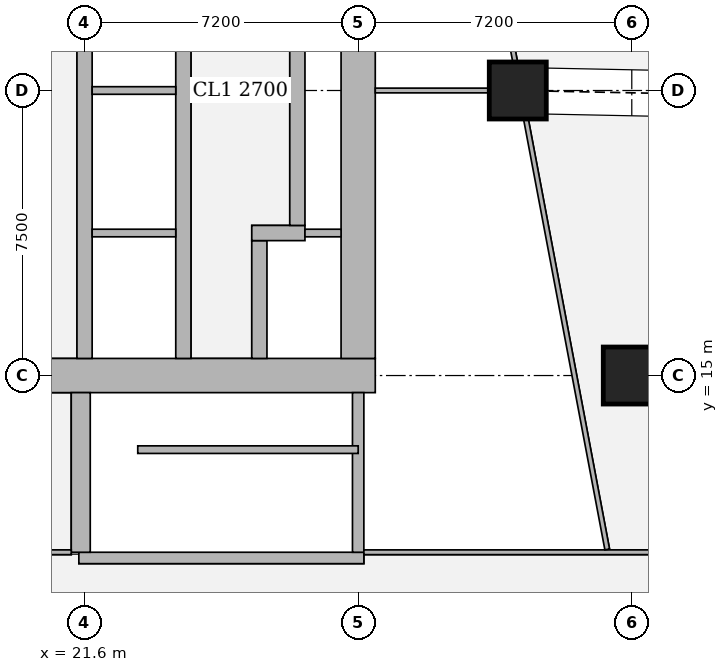
"""IFC4 building model, lengths in metres.
Left out: names, types, materials, properties, quantities, classifications, styles, units other than length and angle.
Written with IfcOpenShell. Run it as: python <this file> out.ifc"""

import sys

from ifc_helpers import new_model, si_unit, direction, frame, frame_2d, origin, origin_2d, place, context, subcontext, project, spatial, rectangle, extrude, element, fill, save


model = new_model("IFC4")
c1 = context("Model", 3, precision=1e-05, world=origin(), true_north=direction((0.0, 1.0)))
c2 = subcontext(c1, "Body", "Model", "MODEL_VIEW")
j1 = project(units=[si_unit("LENGTHUNIT", "METRE"), si_unit("PLANEANGLEUNIT", "RADIAN")], contexts=[c1])
p1 = place(None, origin())
s1 = spatial("IfcSite", under=j1, at=p1, CompositionType="ELEMENT")
p2 = place(p1, origin())
s2 = spatial("IfcBuilding", under=s1, at=p2, CompositionType="ELEMENT")
p3 = place(p2, frame((0.0, 0.0, 180.8)))
s3 = spatial("IfcBuildingStorey", under=s2, at=p3, CompositionType="ELEMENT", Elevation=180.8)
for number, where, z_axis, x_axis in (
    (1, (36.0, 15.0, 0.0), (0.0, 0.0, 1.0), (1.0, 0.0, 0.0)),
    (2, (33.0, 22.5, 0.0), (0.0, 0.0, 1.0), (1.0, 0.0, 0.0)),
):
    element("IfcColumn", number, at=place(p3, frame(where, z_axis=z_axis, x_axis=x_axis)), inside=s3, PredefinedType="COLUMN", context=c2, shape_type="SweptSolid", body=[
        extrude(rectangle(XDim=1.5, YDim=1.5, at=origin_2d()), origin(), (0.0, 0.0, 1.0), 3.75),
    ])
p4 = place(p3, frame((13.95, 15.0, 0.0), z_axis=(0.0, 0.0, 1.0), x_axis=(1.0, 0.0, 0.0)))
e3 = element("IfcWall", 3, at=p4, inside=s3, PredefinedType="SHEAR", context=c2, shape_type="SweptSolid", body=[
    extrude(rectangle(XDim=15.3, YDim=0.9, at=frame_2d((7.65, 0.0))), origin(), (0.0, 0.0, 1.0), 3.75),
])
p5 = place(p4, frame((4.45, 0.0, 0.0)))
e4 = element("IfcOpeningElement", 4, at=p5, cuts=e3, PredefinedType="OPENING", context=c2, shape_type="SweptSolid", body=[
    extrude(rectangle(XDim=1.8, YDim=2.1, at=frame_2d((0.9, 1.05))), frame((0.0, 0.46, 0.0), z_axis=(0.0, -1.0, 0.0), x_axis=(1.0, 0.0, 0.0)), (0.0, 0.0, 1.0), 0.92),
])
p6 = place(p4, frame((10.7, 0.0, 0.0)))
e5 = element("IfcOpeningElement", 5, at=p6, cuts=e3, PredefinedType="OPENING", context=c2, shape_type="SweptSolid", body=[
    extrude(rectangle(XDim=1.1, YDim=2.1, at=frame_2d((0.55, 1.05))), frame((0.0, 0.46, 0.0), z_axis=(0.0, -1.0, 0.0), x_axis=(1.0, 0.0, 0.0)), (0.0, 0.0, 1.0), 0.92),
])
p7 = place(p3, frame((28.8, 15.45, 0.0), z_axis=(0.0, 0.0, 1.0), x_axis=(0.0, 1.0, 0.0)))
e6 = element("IfcWall", 6, at=p7, inside=s3, PredefinedType="SHEAR", context=c2, shape_type="SweptSolid", body=[
    extrude(rectangle(XDim=14.1, YDim=0.9, at=frame_2d((7.05, 0.0))), origin(), (0.0, 0.0, 1.0), 3.75),
])
p8 = place(p3, frame((21.6, 15.45, 0.0), z_axis=(0.0, 0.0, 1.0), x_axis=(0.0, 1.0, 0.0)))
e7 = element("IfcWall", 7, at=p8, inside=s3, PredefinedType="SHEAR", context=c2, shape_type="SweptSolid", body=[
    extrude(rectangle(XDim=14.1, YDim=0.4, at=frame_2d((7.05, 0.0))), origin(), (0.0, 0.0, 1.0), 3.75),
])
p9 = place(p8, frame((0.875, 0.0, 0.0)))
e8 = element("IfcOpeningElement", 8, at=p9, cuts=e7, PredefinedType="OPENING", context=c2, shape_type="SweptSolid", body=[
    extrude(rectangle(XDim=1.1, YDim=2.1, at=frame_2d((0.55, 1.05))), frame((0.0, 0.21, 0.0), z_axis=(0.0, -1.0, 0.0), x_axis=(1.0, 0.0, 0.0)), (0.0, 0.0, 1.0), 0.42),
])
p10 = place(p8, frame((4.625, 0.0, 0.0)))
e9 = element("IfcOpeningElement", 9, at=p10, cuts=e7, PredefinedType="OPENING", context=c2, shape_type="SweptSolid", body=[
    extrude(rectangle(XDim=1.1, YDim=2.1, at=frame_2d((0.55, 1.05))), frame((0.0, 0.21, 0.0), z_axis=(0.0, -1.0, 0.0), x_axis=(1.0, 0.0, 0.0)), (0.0, 0.0, 1.0), 0.42),
])
p11 = place(p8, frame((8.375, 0.0, 0.0)))
e10 = element("IfcOpeningElement", 10, at=p11, cuts=e7, PredefinedType="OPENING", context=c2, shape_type="SweptSolid", body=[
    extrude(rectangle(XDim=1.1, YDim=2.1, at=frame_2d((0.55, 1.05))), frame((0.0, 0.21, 0.0), z_axis=(0.0, -1.0, 0.0), x_axis=(1.0, 0.0, 0.0)), (0.0, 0.0, 1.0), 0.42),
])
p12 = place(p8, frame((12.125, 0.0, 0.0)))
e11 = element("IfcOpeningElement", 11, at=p12, cuts=e7, PredefinedType="OPENING", context=c2, shape_type="SweptSolid", body=[
    extrude(rectangle(XDim=1.1, YDim=2.1, at=frame_2d((0.55, 1.05))), frame((0.0, 0.21, 0.0), z_axis=(0.0, -1.0, 0.0), x_axis=(1.0, 0.0, 0.0)), (0.0, 0.0, 1.0), 0.42),
])
p13 = place(p3, frame((24.2, 15.45, 0.0), z_axis=(0.0, 0.0, 1.0), x_axis=(0.0, 1.0, 0.0)))
e12 = element("IfcWall", 12, at=p13, inside=s3, PredefinedType="SHEAR", context=c2, shape_type="SweptSolid", body=[
    extrude(rectangle(XDim=14.1, YDim=0.4, at=frame_2d((7.05, 0.0))), origin(), (0.0, 0.0, 1.0), 3.75),
])
p14 = place(p3, frame((26.2, 15.45, 0.0), z_axis=(0.0, 0.0, 1.0), x_axis=(0.0, 1.0, 0.0)))
e13 = element("IfcWall", 13, at=p14, inside=s3, PredefinedType="SHEAR", context=c2, shape_type="SweptSolid", body=[
    extrude(rectangle(XDim=3.1, YDim=0.4, at=frame_2d((1.55, 0.0))), origin(), (0.0, 0.0, 1.0), 3.75),
])
p15 = place(p14, frame((0.825, 0.0, 0.0)))
e14 = element("IfcOpeningElement", 14, at=p15, cuts=e13, PredefinedType="OPENING", context=c2, shape_type="SweptSolid", body=[
    extrude(rectangle(XDim=1.2, YDim=2.1, at=frame_2d((0.6, 1.05))), frame((0.0, 0.21, 0.0), z_axis=(0.0, -1.0, 0.0), x_axis=(1.0, 0.0, 0.0)), (0.0, 0.0, 1.0), 0.42),
])
p16 = place(p3, frame((26.0, 18.75, 0.0), z_axis=(0.0, 0.0, 1.0), x_axis=(1.0, 0.0, 0.0)))
e15 = element("IfcWall", 15, at=p16, inside=s3, PredefinedType="SHEAR", context=c2, shape_type="SweptSolid", body=[
    extrude(rectangle(XDim=1.4, YDim=0.4, at=frame_2d((0.7, 0.0))), origin(), (0.0, 0.0, 1.0), 3.75),
])
p17 = place(p3, frame((27.2, 18.95, 0.0), z_axis=(0.0, 0.0, 1.0), x_axis=(0.0, 1.0, 0.0)))
e16 = element("IfcWall", 16, at=p17, inside=s3, PredefinedType="SHEAR", context=c2, shape_type="SweptSolid", body=[
    extrude(rectangle(XDim=7.1, YDim=0.4, at=frame_2d((3.55, 0.0))), origin(), (0.0, 0.0, 1.0), 3.75),
])
p18 = place(p3, frame((21.45, 10.2, 0.0), z_axis=(0.0, 0.0, 1.0), x_axis=(1.0, 0.0, 0.0)))
e17 = element("IfcWall", 17, at=p18, inside=s3, PredefinedType="SHEAR", context=c2, shape_type="SweptSolid", body=[
    extrude(rectangle(XDim=7.5, YDim=0.3, at=frame_2d((3.75, 0.0))), origin(), (0.0, 0.0, 1.0), 3.75),
])
p19 = place(p18, frame((0.5, 0.0, 0.0)))
e18 = element("IfcOpeningElement", 18, at=p19, cuts=e17, PredefinedType="OPENING", context=c2, shape_type="SweptSolid", body=[
    extrude(rectangle(XDim=1.1, YDim=2.1, at=frame_2d((0.55, 1.05))), frame((0.0, 0.16, 0.0), z_axis=(0.0, -1.0, 0.0), x_axis=(1.0, 0.0, 0.0)), (0.0, 0.0, 1.0), 0.32),
])
p20 = place(p3, frame((21.5, 10.35, 0.0), z_axis=(0.0, 0.0, 1.0), x_axis=(0.0, 1.0, 0.0)))
e19 = element("IfcWall", 19, at=p20, inside=s3, PredefinedType="SHEAR", context=c2, shape_type="SweptSolid", body=[
    extrude(rectangle(XDim=4.2, YDim=0.5, at=frame_2d((2.1, 0.0))), origin(), (0.0, 0.0, 1.0), 3.75),
])
p21 = place(p3, frame((28.8, 10.35, 0.0), z_axis=(0.0, 0.0, 1.0), x_axis=(0.0, 1.0, 0.0)))
e20 = element("IfcWall", 20, at=p21, inside=s3, PredefinedType="SHEAR", context=c2, shape_type="SweptSolid", body=[
    extrude(rectangle(XDim=4.2, YDim=0.3, at=frame_2d((2.1, 0.0))), origin(), (0.0, 0.0, 1.0), 3.75),
])
p22 = place(p3, frame((33.623, 43.022, 0.0), z_axis=(0.0, 0.0, 1.0), x_axis=(0.185596841028, -0.98262597798, 0.0)))
e21 = element("IfcWall", 21, at=p22, inside=s3, PredefinedType="SOLIDWALL", context=c2, shape_type="SweptSolid", body=[
    extrude(rectangle(XDim=41.66, YDim=0.15, at=frame_2d((20.83, 0.0))), origin(), (0.0, 0.0, 1.0), 2.5),
])
p23 = place(p22, frame((8.034, 0.0, 0.0)))
e22 = element("IfcOpeningElement", 22, at=p23, cuts=e21, PredefinedType="OPENING", context=c2, shape_type="SweptSolid", body=[
    extrude(rectangle(XDim=1.0, YDim=2.1, at=frame_2d((0.5, 1.05))), frame((0.0, 0.085, 0.0), z_axis=(0.0, -1.0, 0.0), x_axis=(1.0, 0.0, 0.0)), (0.0, 0.0, 1.0), 0.17),
])
p24 = place(p22, frame((12.611, 0.0, 0.0)))
e23 = element("IfcOpeningElement", 23, at=p24, cuts=e21, PredefinedType="OPENING", context=c2, shape_type="SweptSolid", body=[
    extrude(rectangle(XDim=1.0, YDim=2.1, at=frame_2d((0.5, 1.05))), frame((0.0, 0.085, 0.0), z_axis=(0.0, -1.0, 0.0), x_axis=(1.0, 0.0, 0.0)), (0.0, 0.0, 1.0), 0.17),
])
p25 = place(p22, frame((20.242, 0.0, 0.0)))
e24 = element("IfcOpeningElement", 24, at=p25, cuts=e21, PredefinedType="OPENING", context=c2, shape_type="SweptSolid", body=[
    extrude(rectangle(XDim=1.0, YDim=2.1, at=frame_2d((0.5, 1.05))), frame((0.0, 0.085, 0.0), z_axis=(0.0, -1.0, 0.0), x_axis=(1.0, 0.0, 0.0)), (0.0, 0.0, 1.0), 0.17),
])
p26 = place(p22, frame((31.206, 0.0, 0.0)))
e25 = element("IfcOpeningElement", 25, at=p26, cuts=e21, PredefinedType="OPENING", context=c2, shape_type="SweptSolid", body=[
    extrude(rectangle(XDim=1.0, YDim=2.1, at=frame_2d((0.5, 1.05))), frame((0.0, 0.085, 0.0), z_axis=(0.0, -1.0, 0.0), x_axis=(1.0, 0.0, 0.0)), (0.0, 0.0, 1.0), 0.17),
])
p27 = place(p3, frame((10.413, 10.35, 0.0), z_axis=(0.0, 0.0, 1.0), x_axis=(1.0, 0.0, 0.0)))
e26 = element("IfcWall", 26, at=p27, inside=s3, PredefinedType="PARTITIONING", context=c2, shape_type="SweptSolid", body=[
    extrude(rectangle(XDim=10.837, YDim=0.125, at=frame_2d((5.418, 0.0))), origin(), (0.0, 0.0, 1.0), 3.5),
])
p28 = place(p27, frame((7.582, 0.0, 0.0)))
e27 = element("IfcOpeningElement", 27, at=p28, cuts=e26, PredefinedType="OPENING", context=c2, shape_type="SweptSolid", body=[
    extrude(rectangle(XDim=1.8, YDim=2.1, at=frame_2d((0.9, 1.05))), frame((0.0, 0.073, 0.0), z_axis=(0.0, -1.0, 0.0), x_axis=(1.0, 0.0, 0.0)), (0.0, 0.0, 1.0), 0.145),
])
p29 = place(p3, frame((28.95, 10.35, 0.0), z_axis=(0.0, 0.0, 1.0), x_axis=(1.0, 0.0, 0.0)))
e28 = element("IfcWall", 28, at=p29, inside=s3, PredefinedType="PARTITIONING", context=c2, shape_type="SweptSolid", body=[
    extrude(rectangle(XDim=9.013, YDim=0.125, at=frame_2d((4.506, 0.0))), origin(), (0.0, 0.0, 1.0), 3.5),
])
p30 = place(p3, frame((35.354, 10.424, 0.0), z_axis=(0.0, 0.0, 1.0), x_axis=(-0.185612234763, 0.982623070311, 0.0)))
e29 = element("IfcWall", 29, at=p30, inside=s3, PredefinedType="PARTITIONING", context=c2, shape_type="SweptSolid", body=[
    extrude(rectangle(XDim=11.513, YDim=0.125, at=frame_2d((5.756, 0.0))), origin(), (0.0, 0.0, 1.0), 3.5),
])
p31 = place(p30, frame((0.697, 0.0, 0.0)))
e30 = element("IfcOpeningElement", 30, at=p31, cuts=e29, PredefinedType="OPENING", context=c2, shape_type="SweptSolid", body=[
    extrude(rectangle(XDim=1.0, YDim=2.1, at=frame_2d((0.5, 1.05))), frame((0.0, 0.073, 0.0), z_axis=(0.0, -1.0, 0.0), x_axis=(1.0, 0.0, 0.0)), (0.0, 0.0, 1.0), 0.145),
])
p32 = place(p3, frame((32.929, 23.263, 0.0), z_axis=(0.0, 0.0, 1.0), x_axis=(-0.185612234763, 0.982623070311, 0.0)))
e31 = element("IfcWall", 31, at=p32, inside=s3, PredefinedType="PARTITIONING", context=c2, shape_type="SweptSolid", body=[
    extrude(rectangle(XDim=11.513, YDim=0.125, at=frame_2d((5.756, 0.0))), origin(), (0.0, 0.0, 1.0), 3.5),
])
p33 = place(p32, frame((0.15, 0.0, 0.0)))
e32 = element("IfcOpeningElement", 32, at=p33, cuts=e31, PredefinedType="OPENING", context=c2, shape_type="SweptSolid", body=[
    extrude(rectangle(XDim=1.0, YDim=2.1, at=frame_2d((0.5, 1.05))), frame((0.0, 0.073, 0.0), z_axis=(0.0, -1.0, 0.0), x_axis=(1.0, 0.0, 0.0)), (0.0, 0.0, 1.0), 0.145),
])
p34 = place(p32, frame((7.679, 0.0, 0.0)))
e33 = element("IfcOpeningElement", 33, at=p34, cuts=e31, PredefinedType="OPENING", context=c2, shape_type="SweptSolid", body=[
    extrude(rectangle(XDim=1.0, YDim=2.1, at=frame_2d((0.5, 1.05))), frame((0.0, 0.073, 0.0), z_axis=(0.0, -1.0, 0.0), x_axis=(1.0, 0.0, 0.0)), (0.0, 0.0, 1.0), 0.145),
])
p35 = place(p32, frame((10.122, 0.0, 0.0)))
e34 = element("IfcOpeningElement", 34, at=p35, cuts=e31, PredefinedType="OPENING", context=c2, shape_type="SweptSolid", body=[
    extrude(rectangle(XDim=1.0, YDim=2.1, at=frame_2d((0.5, 1.05))), frame((0.0, 0.073, 0.0), z_axis=(0.0, -1.0, 0.0), x_axis=(1.0, 0.0, 0.0)), (0.0, 0.0, 1.0), 0.145),
])
p36 = place(p3, frame((29.25, 22.5, 0.0), z_axis=(0.0, 0.0, 1.0), x_axis=(1.0, 0.0, 0.0)))
e35 = element("IfcWall", 35, at=p36, inside=s3, PredefinedType="PARTITIONING", context=c2, shape_type="SweptSolid", body=[
    extrude(rectangle(XDim=2.999, YDim=0.125, at=frame_2d((1.5, 0.0))), origin(), (0.0, 0.0, 1.0), 3.5),
])
p37 = place(p3, frame((23.0, 13.05, 0.0), z_axis=(0.0, 0.0, 1.0), x_axis=(1.0, 0.0, 0.0)))
e36 = element("IfcWall", 36, at=p37, inside=s3, PredefinedType="SHEAR", context=c2, shape_type="SweptSolid", body=[
    extrude(rectangle(XDim=5.8, YDim=0.2, at=frame_2d((2.9, 0.0))), origin(), (0.0, 0.0, 1.0), 3.75),
])
for number, where, z_axis, x_axis in (
    (37, (21.8, 18.75, 0.0), (0.0, 0.0, 1.0), (1.0, 0.0, 0.0)),
    (38, (21.8, 22.5, 0.0), (0.0, 0.0, 1.0), (1.0, 0.0, 0.0)),
):
    element("IfcWall", number, at=place(p3, frame(where, z_axis=z_axis, x_axis=x_axis)), inside=s3, PredefinedType="SOLIDWALL", context=c2, shape_type="SweptSolid", body=[
        extrude(rectangle(XDim=2.2, YDim=0.2, at=frame_2d((1.1, 0.0))), origin(), (0.0, 0.0, 1.0), 3.5),
    ])
p38 = place(p3, frame((27.4, 18.75, 0.0), z_axis=(0.0, 0.0, 1.0), x_axis=(1.0, 0.0, 0.0)))
e39 = element("IfcWall", 39, at=p38, inside=s3, PredefinedType="SOLIDWALL", context=c2, shape_type="SweptSolid", body=[
    extrude(rectangle(XDim=0.95, YDim=0.2, at=frame_2d((0.475, 0.0))), origin(), (0.0, 0.0, 1.0), 3.5),
])
p39 = place(p31, origin())
e40 = element("IfcDoor", 40, at=p39, inside=s3, OperationType="SINGLE_SWING_LEFT", PredefinedType="DOOR", context=c2, shape_type="SweptSolid", body=[
    extrude(rectangle(XDim=1.0, YDim=2.1, at=frame_2d((0.5, 1.05))), frame((0.0, 0.025, 0.0), z_axis=(0.0, -1.0, 0.0), x_axis=(1.0, 0.0, 0.0)), (0.0, 0.0, 1.0), 0.05),
])
fill(e30, e40)
p40 = place(p33, origin())
e41 = element("IfcDoor", 41, at=p40, inside=s3, OperationType="SINGLE_SWING_LEFT", PredefinedType="DOOR", context=c2, shape_type="SweptSolid", body=[
    extrude(rectangle(XDim=1.0, YDim=2.1, at=frame_2d((0.5, 1.05))), frame((0.0, 0.025, 0.0), z_axis=(0.0, -1.0, 0.0), x_axis=(1.0, 0.0, 0.0)), (0.0, 0.0, 1.0), 0.05),
])
fill(e32, e41)
p41 = place(p6, origin())
e42 = element("IfcDoor", 42, at=p41, inside=s3, OperationType="SINGLE_SWING_RIGHT", PredefinedType="DOOR", context=c2, shape_type="SweptSolid", body=[
    extrude(rectangle(XDim=1.1, YDim=2.1, at=frame_2d((0.55, 1.05))), frame((0.0, 0.025, 0.0), z_axis=(0.0, -1.0, 0.0), x_axis=(1.0, 0.0, 0.0)), (0.0, 0.0, 1.0), 0.05),
])
fill(e5, e42)
p42 = place(p15, origin())
e43 = element("IfcDoor", 43, at=p42, inside=s3, OperationType="DOUBLE_DOOR_SLIDING", PredefinedType="DOOR", context=c2, shape_type="SweptSolid", body=[
    extrude(rectangle(XDim=1.2, YDim=2.1, at=frame_2d((0.6, 1.05))), frame((0.0, 0.025, 0.0), z_axis=(0.0, -1.0, 0.0), x_axis=(1.0, 0.0, 0.0)), (0.0, 0.0, 1.0), 0.05),
])
fill(e14, e43)
p43 = place(p9, origin())
e44 = element("IfcDoor", 44, at=p43, inside=s3, OperationType="DOUBLE_DOOR_SLIDING", PredefinedType="DOOR", context=c2, shape_type="SweptSolid", body=[
    extrude(rectangle(XDim=1.1, YDim=2.1, at=frame_2d((0.55, 1.05))), frame((0.0, 0.025, 0.0), z_axis=(0.0, -1.0, 0.0), x_axis=(1.0, 0.0, 0.0)), (0.0, 0.0, 1.0), 0.05),
])
fill(e8, e44)
p44 = place(p10, origin())
e45 = element("IfcDoor", 45, at=p44, inside=s3, OperationType="DOUBLE_DOOR_SLIDING", PredefinedType="DOOR", context=c2, shape_type="SweptSolid", body=[
    extrude(rectangle(XDim=1.1, YDim=2.1, at=frame_2d((0.55, 1.05))), frame((0.0, 0.025, 0.0), z_axis=(0.0, -1.0, 0.0), x_axis=(1.0, 0.0, 0.0)), (0.0, 0.0, 1.0), 0.05),
])
fill(e9, e45)
p45 = place(p19, origin())
e46 = element("IfcDoor", 46, at=p45, inside=s3, OperationType="SINGLE_SWING_LEFT", PredefinedType="DOOR", context=c2, shape_type="SweptSolid", body=[
    extrude(rectangle(XDim=1.1, YDim=2.1, at=frame_2d((0.55, 1.05))), frame((0.0, 0.025, 0.0), z_axis=(0.0, -1.0, 0.0), x_axis=(1.0, 0.0, 0.0)), (0.0, 0.0, 1.0), 0.05),
])
fill(e18, e46)
save(model, sys.argv[1])
